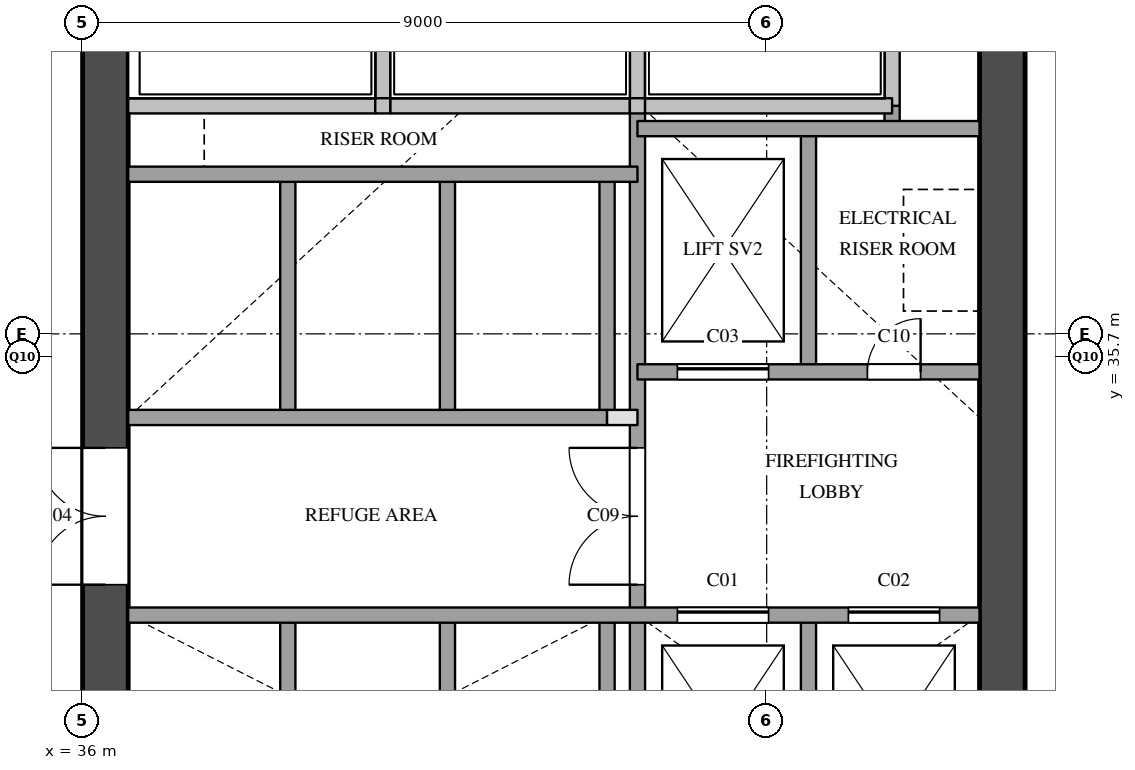
"""IFC4 building model, lengths in metres.
Left out: names, types, materials, properties, quantities, classifications, styles, units other than length and angle.
Written with IfcOpenShell. Run it as: python <this file> out.ifc"""

import sys

from ifc_helpers import new_model, si_unit, direction, frame, frame_2d, origin, place, context, subcontext, project, spatial, rectangle, extrude, element, fill, save


model = new_model("IFC4")
c1 = context("Model", 3, precision=1e-05, world=origin(), true_north=direction((0.0, 1.0)))
c2 = subcontext(c1, "Body", "Model", "MODEL_VIEW")
j1 = project(units=[si_unit("LENGTHUNIT", "METRE"), si_unit("PLANEANGLEUNIT", "RADIAN")], contexts=[c1])
p1 = place(None, origin())
s1 = spatial("IfcSite", under=j1, at=p1, CompositionType="ELEMENT")
p2 = place(p1, origin())
s2 = spatial("IfcBuilding", under=s1, at=p2, CompositionType="ELEMENT")
p3 = place(p2, frame((0.0, 0.0, 123.4)))
s3 = spatial("IfcBuildingStorey", under=s2, at=p3, CompositionType="ELEMENT", Elevation=123.4)
p4 = place(p3, frame((36.3, 29.1, 0.0), z_axis=(0.0, 0.0, 1.0), x_axis=(0.0, 1.0, 0.0)))
e1 = element("IfcWall", 1, at=p4, inside=s3, PredefinedType="SHEAR", context=c2, shape_type="SweptSolid", body=[
    extrude(rectangle(XDim=20.3, YDim=0.6, at=frame_2d((10.15, 0.0))), origin(), (0.0, 0.0, 1.0), 5.7),
])
p5 = place(p4, frame((3.6, 0.0, 0.0)))
e2 = element("IfcOpeningElement", 2, at=p5, cuts=e1, PredefinedType="OPENING", context=c2, shape_type="SweptSolid", body=[
    extrude(rectangle(XDim=1.8, YDim=2.1, at=frame_2d((0.9, 1.05))), frame((0.0, 0.31, 0.0), z_axis=(0.0, -1.0, 0.0), x_axis=(1.0, 0.0, 0.0)), (0.0, 0.0, 1.0), 0.62),
])
p6 = place(p4, frame((16.4, 0.0, 0.0)))
e3 = element("IfcOpeningElement", 3, at=p6, cuts=e1, PredefinedType="OPENING", context=c2, shape_type="SweptSolid", body=[
    extrude(rectangle(XDim=1.0, YDim=2.1, at=frame_2d((0.5, 1.05))), frame((0.0, 0.31, 0.0), z_axis=(0.0, -1.0, 0.0), x_axis=(1.0, 0.0, 0.0)), (0.0, 0.0, 1.0), 0.62),
])
p7 = place(p3, frame((48.1, 29.1, 0.0), z_axis=(0.0, 0.0, 1.0), x_axis=(0.0, 1.0, 0.0)))
e4 = element("IfcWall", 4, at=p7, inside=s3, PredefinedType="SHEAR", context=c2, shape_type="SweptSolid", body=[
    extrude(rectangle(XDim=20.3, YDim=0.6, at=frame_2d((10.15, 0.0))), origin(), (0.0, 0.0, 1.0), 5.7),
])
p8 = place(p7, frame((12.5, 0.0, 0.0)))
e5 = element("IfcOpeningElement", 5, at=p8, cuts=e4, PredefinedType="OPENING", context=c2, shape_type="SweptSolid", body=[
    extrude(rectangle(XDim=0.7, YDim=2.1, at=frame_2d((0.35, 1.05))), frame((0.0, 0.31, 0.0), z_axis=(0.0, -1.0, 0.0), x_axis=(1.0, 0.0, 0.0)), (0.0, 0.0, 1.0), 0.62),
])
p9 = place(p3, frame((38.7, 29.1, 0.0), z_axis=(0.0, 0.0, 1.0), x_axis=(0.0, 1.0, 0.0)))
e6 = element("IfcWall", 6, at=p9, inside=s3, PredefinedType="SOLIDWALL", context=c2, shape_type="SweptSolid", body=[
    extrude(rectangle(XDim=3.2, YDim=0.2, at=frame_2d((1.6, 0.0))), origin(), (0.0, 0.0, 1.0), 5.7),
])
p10 = place(p3, frame((38.7, 34.9, 0.0), z_axis=(0.0, 0.0, 1.0), x_axis=(0.0, 1.0, 0.0)))
e7 = element("IfcWall", 7, at=p10, inside=s3, PredefinedType="SOLIDWALL", context=c2, shape_type="SweptSolid", body=[
    extrude(rectangle(XDim=3.2, YDim=0.2, at=frame_2d((1.6, 0.0))), origin(), (0.0, 0.0, 1.0), 5.7),
])
p11 = place(p3, frame((39.95, 39.0, 0.0), z_axis=(0.0, 0.0, 1.0), x_axis=(0.0, 1.0, 0.0)))
e8 = element("IfcWall", 8, at=p11, inside=s3, PredefinedType="SOLIDWALL", context=c2, shape_type="SweptSolid", body=[
    extrude(rectangle(XDim=2.02, YDim=0.2, at=frame_2d((1.01, 0.0))), origin(), (0.0, 0.0, 1.0), 5.7),
])
p12 = place(p3, frame((40.8, 29.1, 0.0), z_axis=(0.0, 0.0, 1.0), x_axis=(0.0, 1.0, 0.0)))
e9 = element("IfcWall", 9, at=p12, inside=s3, PredefinedType="SOLIDWALL", context=c2, shape_type="SweptSolid", body=[
    extrude(rectangle(XDim=3.2, YDim=0.2, at=frame_2d((1.6, 0.0))), origin(), (0.0, 0.0, 1.0), 5.7),
])
p13 = place(p3, frame((40.8, 34.9, 0.0), z_axis=(0.0, 0.0, 1.0), x_axis=(0.0, 1.0, 0.0)))
e10 = element("IfcWall", 10, at=p13, inside=s3, PredefinedType="SOLIDWALL", context=c2, shape_type="SweptSolid", body=[
    extrude(rectangle(XDim=3.2, YDim=0.2, at=frame_2d((1.6, 0.0))), origin(), (0.0, 0.0, 1.0), 5.7),
])
p14 = place(p3, frame((42.9, 29.1, 0.0), z_axis=(0.0, 0.0, 1.0), x_axis=(0.0, 1.0, 0.0)))
e11 = element("IfcWall", 11, at=p14, inside=s3, PredefinedType="SOLIDWALL", context=c2, shape_type="SweptSolid", body=[
    extrude(rectangle(XDim=3.2, YDim=0.2, at=frame_2d((1.6, 0.0))), origin(), (0.0, 0.0, 1.0), 5.7),
])
p15 = place(p3, frame((42.9, 34.9, 0.0), z_axis=(0.0, 0.0, 1.0), x_axis=(0.0, 1.0, 0.0)))
e12 = element("IfcWall", 12, at=p15, inside=s3, PredefinedType="SOLIDWALL", context=c2, shape_type="SweptSolid", body=[
    extrude(rectangle(XDim=3.2, YDim=0.2, at=frame_2d((1.6, 0.0))), origin(), (0.0, 0.0, 1.0), 5.7),
])
p16 = place(p3, frame((43.3, 29.1, 0.0), z_axis=(0.0, 0.0, 1.0), x_axis=(0.0, 1.0, 0.0)))
e13 = element("IfcWall", 13, at=p16, inside=s3, PredefinedType="SOLIDWALL", context=c2, shape_type="SweptSolid", body=[
    extrude(rectangle(XDim=9.9, YDim=0.2, at=frame_2d((4.95, 0.0))), origin(), (0.0, 0.0, 1.0), 5.7),
])
p17 = place(p16, frame((3.6, 0.0, 0.0)))
e14 = element("IfcOpeningElement", 14, at=p17, cuts=e13, PredefinedType="OPENING", context=c2, shape_type="SweptSolid", body=[
    extrude(rectangle(XDim=1.8, YDim=2.1, at=frame_2d((0.9, 1.05))), frame((0.0, 0.11, 0.0), z_axis=(0.0, -1.0, 0.0), x_axis=(1.0, 0.0, 0.0)), (0.0, 0.0, 1.0), 0.22),
])
p18 = place(p3, frame((43.3, 39.0, 0.0), z_axis=(0.0, 0.0, 1.0), x_axis=(0.0, 1.0, 0.0)))
e15 = element("IfcWall", 15, at=p18, inside=s3, PredefinedType="SOLIDWALL", context=c2, shape_type="SweptSolid", body=[
    extrude(rectangle(XDim=2.02, YDim=0.2, at=frame_2d((1.01, 0.0))), origin(), (0.0, 0.0, 1.0), 5.7),
])
for number, where, z_axis, x_axis in (
    (16, (45.55, 29.1, 0.0), (0.0, 0.0, 1.0), (0.0, 1.0, 0.0)),
    (17, (45.55, 35.5, 0.0), (0.0, 0.0, 1.0), (0.0, 1.0, 0.0)),
):
    element("IfcWall", number, at=place(p3, frame(where, z_axis=z_axis, x_axis=x_axis)), inside=s3, PredefinedType="SOLIDWALL", context=c2, shape_type="SweptSolid", body=[
        extrude(rectangle(XDim=3.2, YDim=0.2, at=frame_2d((1.6, 0.0))), origin(), (0.0, 0.0, 1.0), 5.7),
    ])
p19 = place(p3, frame((46.65, 38.7, 0.0), z_axis=(0.0, 0.0, 1.0), x_axis=(0.0, 1.0, 0.0)))
e18 = element("IfcWall", 18, at=p19, inside=s3, PredefinedType="SOLIDWALL", context=c2, shape_type="SweptSolid", body=[
    extrude(rectangle(XDim=0.3, YDim=0.2, at=frame_2d((0.15, 0.0))), origin(), (0.0, 0.0, 1.0), 5.7),
])
p20 = place(p3, frame((46.65, 39.0, 0.0), z_axis=(0.0, 0.0, 1.0), x_axis=(0.0, 1.0, 0.0)))
e19 = element("IfcWall", 19, at=p20, inside=s3, PredefinedType="SOLIDWALL", context=c2, shape_type="SweptSolid", body=[
    extrude(rectangle(XDim=2.02, YDim=0.2, at=frame_2d((1.01, 0.0))), origin(), (0.0, 0.0, 1.0), 5.7),
])
p21 = place(p3, frame((36.6, 32.3, 0.0), z_axis=(0.0, 0.0, 1.0), x_axis=(1.0, 0.0, 0.0)))
e20 = element("IfcWall", 20, at=p21, inside=s3, PredefinedType="SOLIDWALL", context=c2, shape_type="SweptSolid", body=[
    extrude(rectangle(XDim=11.2, YDim=0.2, at=frame_2d((5.6, 0.0))), origin(), (0.0, 0.0, 1.0), 5.7),
])
p22 = place(p21, frame((7.225, 0.0, 0.0)))
e21 = element("IfcOpeningElement", 21, at=p22, cuts=e20, PredefinedType="OPENING", context=c2, shape_type="SweptSolid", body=[
    extrude(rectangle(XDim=1.2, YDim=2.1, at=frame_2d((0.6, 1.05))), frame((0.0, 0.11, 0.0), z_axis=(0.0, -1.0, 0.0), x_axis=(1.0, 0.0, 0.0)), (0.0, 0.0, 1.0), 0.22),
])
p23 = place(p21, frame((9.475, 0.0, 0.0)))
e22 = element("IfcOpeningElement", 22, at=p23, cuts=e20, PredefinedType="OPENING", context=c2, shape_type="SweptSolid", body=[
    extrude(rectangle(XDim=1.2, YDim=2.1, at=frame_2d((0.6, 1.05))), frame((0.0, 0.11, 0.0), z_axis=(0.0, -1.0, 0.0), x_axis=(1.0, 0.0, 0.0)), (0.0, 0.0, 1.0), 0.22),
])
p24 = place(p3, frame((42.9, 34.9, 0.0), z_axis=(0.0, 0.0, 1.0), x_axis=(1.0, 0.0, 0.0)))
e23 = element("IfcWall", 23, at=p24, inside=s3, PredefinedType="PARTITIONING", context=c2, shape_type="SweptSolid", body=[
    extrude(rectangle(XDim=0.4, YDim=0.2, at=frame_2d((0.2, 0.0))), origin(), (0.0, 0.0, 1.0), 5.7),
])
p25 = place(p3, frame((36.6, 34.9, 0.0), z_axis=(0.0, 0.0, 1.0), x_axis=(1.0, 0.0, 0.0)))
e24 = element("IfcWall", 24, at=p25, inside=s3, PredefinedType="SOLIDWALL", context=c2, shape_type="SweptSolid", body=[
    extrude(rectangle(XDim=6.3, YDim=0.2, at=frame_2d((3.15, 0.0))), origin(), (0.0, 0.0, 1.0), 5.7),
])
p26 = place(p3, frame((43.3, 35.5, 0.0), z_axis=(0.0, 0.0, 1.0), x_axis=(1.0, 0.0, 0.0)))
e25 = element("IfcWall", 25, at=p26, inside=s3, PredefinedType="SOLIDWALL", context=c2, shape_type="SweptSolid", body=[
    extrude(rectangle(XDim=4.5, YDim=0.2, at=frame_2d((2.25, 0.0))), origin(), (0.0, 0.0, 1.0), 5.7),
])
p27 = place(p26, frame((0.525, 0.0, 0.0)))
e26 = element("IfcOpeningElement", 26, at=p27, cuts=e25, PredefinedType="OPENING", context=c2, shape_type="SweptSolid", body=[
    extrude(rectangle(XDim=1.2, YDim=2.1, at=frame_2d((0.6, 1.05))), frame((0.0, 0.11, 0.0), z_axis=(0.0, -1.0, 0.0), x_axis=(1.0, 0.0, 0.0)), (0.0, 0.0, 1.0), 0.22),
])
p28 = place(p26, frame((3.025, 0.0, 0.0)))
e27 = element("IfcOpeningElement", 27, at=p28, cuts=e25, PredefinedType="OPENING", context=c2, shape_type="SweptSolid", body=[
    extrude(rectangle(XDim=0.7, YDim=2.1, at=frame_2d((0.35, 1.05))), frame((0.0, 0.11, 0.0), z_axis=(0.0, -1.0, 0.0), x_axis=(1.0, 0.0, 0.0)), (0.0, 0.0, 1.0), 0.22),
])
p29 = place(p3, frame((36.6, 38.1, 0.0), z_axis=(0.0, 0.0, 1.0), x_axis=(1.0, 0.0, 0.0)))
e28 = element("IfcWall", 28, at=p29, inside=s3, PredefinedType="SOLIDWALL", context=c2, shape_type="SweptSolid", body=[
    extrude(rectangle(XDim=6.7, YDim=0.2, at=frame_2d((3.35, 0.0))), origin(), (0.0, 0.0, 1.0), 5.7),
])
p30 = place(p3, frame((43.3, 38.7, 0.0), z_axis=(0.0, 0.0, 1.0), x_axis=(1.0, 0.0, 0.0)))
e29 = element("IfcWall", 29, at=p30, inside=s3, PredefinedType="SOLIDWALL", context=c2, shape_type="SweptSolid", body=[
    extrude(rectangle(XDim=4.5, YDim=0.2, at=frame_2d((2.25, 0.0))), origin(), (0.0, 0.0, 1.0), 5.7),
])
p31 = place(p3, frame((36.6, 39.0, 0.0), z_axis=(0.0, 0.0, 1.0), x_axis=(1.0, 0.0, 0.0)))
e30 = element("IfcWall", 30, at=p31, inside=s3, PredefinedType="SOLIDWALL", context=c2, shape_type="SweptSolid", body=[
    extrude(rectangle(XDim=3.25, YDim=0.2, at=frame_2d((1.625, 0.0))), origin(), (0.0, 0.0, 1.0), 5.7),
])
p32 = place(p3, frame((39.85, 39.0, 0.0), z_axis=(0.0, 0.0, 1.0), x_axis=(1.0, 0.0, 0.0)))
e31 = element("IfcWall", 31, at=p32, inside=s3, PredefinedType="SOLIDWALL", context=c2, shape_type="SweptSolid", body=[
    extrude(rectangle(XDim=0.2, YDim=0.2, at=frame_2d((0.1, 0.0))), origin(), (0.0, 0.0, 1.0), 5.7),
])
p33 = place(p3, frame((40.05, 39.0, 0.0), z_axis=(0.0, 0.0, 1.0), x_axis=(1.0, 0.0, 0.0)))
e32 = element("IfcWall", 32, at=p33, inside=s3, PredefinedType="SOLIDWALL", context=c2, shape_type="SweptSolid", body=[
    extrude(rectangle(XDim=3.15, YDim=0.2, at=frame_2d((1.575, 0.0))), origin(), (0.0, 0.0, 1.0), 5.7),
])
p34 = place(p3, frame((43.2, 39.0, 0.0), z_axis=(0.0, 0.0, 1.0), x_axis=(1.0, 0.0, 0.0)))
e33 = element("IfcWall", 33, at=p34, inside=s3, PredefinedType="SOLIDWALL", context=c2, shape_type="SweptSolid", body=[
    extrude(rectangle(XDim=0.2, YDim=0.2, at=frame_2d((0.1, 0.0))), origin(), (0.0, 0.0, 1.0), 5.7),
])
p35 = place(p3, frame((43.4, 39.0, 0.0), z_axis=(0.0, 0.0, 1.0), x_axis=(1.0, 0.0, 0.0)))
e34 = element("IfcWall", 34, at=p35, inside=s3, PredefinedType="SOLIDWALL", context=c2, shape_type="SweptSolid", body=[
    extrude(rectangle(XDim=3.25, YDim=0.2, at=frame_2d((1.625, 0.0))), origin(), (0.0, 0.0, 1.0), 5.7),
])
p36 = place(p22, origin())
e35 = element("IfcDoor", 35, at=p36, inside=s3, OperationType="SLIDING_TO_LEFT", PredefinedType="DOOR", context=c2, shape_type="SweptSolid", body=[
    extrude(rectangle(XDim=1.2, YDim=2.1, at=frame_2d((0.6, 1.05))), frame((0.0, 0.025, 0.0), z_axis=(0.0, -1.0, 0.0), x_axis=(1.0, 0.0, 0.0)), (0.0, 0.0, 1.0), 0.05),
])
fill(e21, e35)
p37 = place(p23, origin())
e36 = element("IfcDoor", 36, at=p37, inside=s3, OperationType="SLIDING_TO_LEFT", PredefinedType="DOOR", context=c2, shape_type="SweptSolid", body=[
    extrude(rectangle(XDim=1.2, YDim=2.1, at=frame_2d((0.6, 1.05))), frame((0.0, 0.025, 0.0), z_axis=(0.0, -1.0, 0.0), x_axis=(1.0, 0.0, 0.0)), (0.0, 0.0, 1.0), 0.05),
])
fill(e22, e36)
p38 = place(p27, origin())
e37 = element("IfcDoor", 37, at=p38, inside=s3, OperationType="SLIDING_TO_LEFT", PredefinedType="DOOR", context=c2, shape_type="SweptSolid", body=[
    extrude(rectangle(XDim=1.2, YDim=2.1, at=frame_2d((0.6, 1.05))), frame((0.0, 0.025, 0.0), z_axis=(0.0, -1.0, 0.0), x_axis=(1.0, 0.0, 0.0)), (0.0, 0.0, 1.0), 0.05),
])
fill(e26, e37)
p39 = place(p5, origin())
e38 = element("IfcDoor", 38, at=p39, inside=s3, OperationType="DOUBLE_DOOR_SINGLE_SWING", PredefinedType="DOOR", context=c2, shape_type="SweptSolid", body=[
    extrude(rectangle(XDim=1.8, YDim=2.1, at=frame_2d((0.9, 1.05))), frame((0.0, 0.025, 0.0), z_axis=(0.0, -1.0, 0.0), x_axis=(1.0, 0.0, 0.0)), (0.0, 0.0, 1.0), 0.05),
])
fill(e2, e38)
p40 = place(p17, origin())
e39 = element("IfcDoor", 39, at=p40, inside=s3, OperationType="DOUBLE_DOOR_SINGLE_SWING", PredefinedType="DOOR", context=c2, shape_type="SweptSolid", body=[
    extrude(rectangle(XDim=1.8, YDim=2.1, at=frame_2d((0.9, 1.05))), frame((0.0, 0.025, 0.0), z_axis=(0.0, -1.0, 0.0), x_axis=(1.0, 0.0, 0.0)), (0.0, 0.0, 1.0), 0.05),
])
fill(e14, e39)
p41 = place(p28, origin())
e40 = element("IfcDoor", 40, at=p41, inside=s3, OperationType="SINGLE_SWING_RIGHT", PredefinedType="DOOR", context=c2, shape_type="SweptSolid", body=[
    extrude(rectangle(XDim=0.7, YDim=2.1, at=frame_2d((0.35, 1.05))), frame((0.0, 0.025, 0.0), z_axis=(0.0, -1.0, 0.0), x_axis=(1.0, 0.0, 0.0)), (0.0, 0.0, 1.0), 0.05),
])
fill(e27, e40)
save(model, sys.argv[1])
